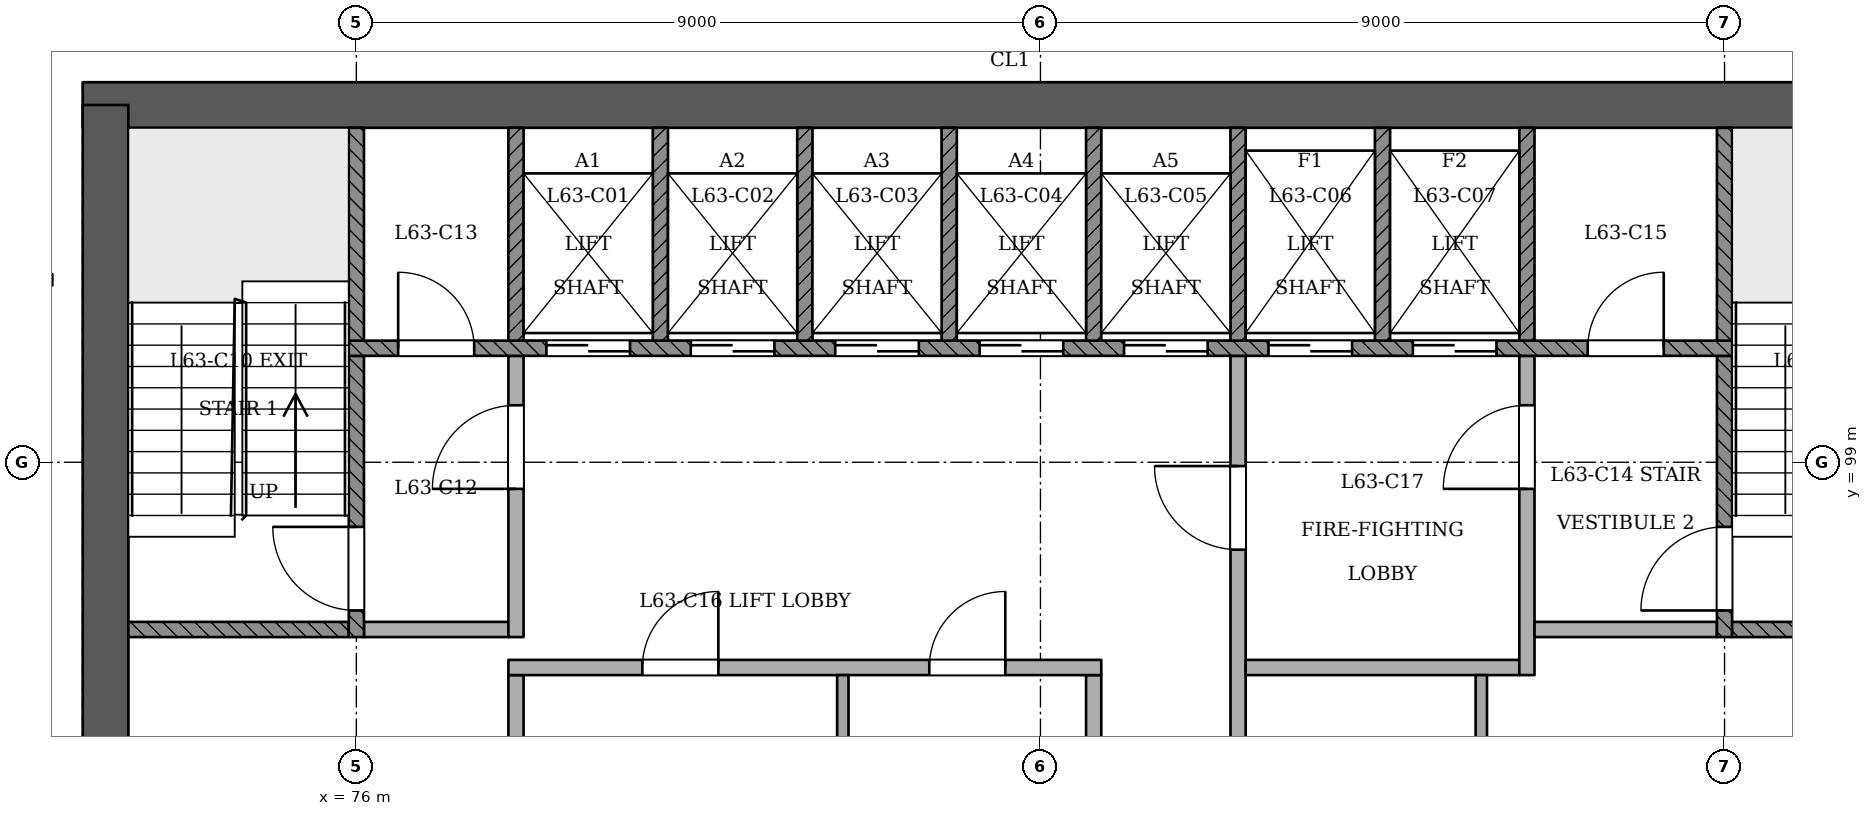
"""IFC4 building model, lengths in metres.
Left out: names, types, materials, properties, quantities, classifications, styles, units other than length and angle.
Written with IfcOpenShell. Run it as: python <this file> out.ifc"""

import sys

from ifc_helpers import new_model, si_unit, direction, frame, frame_2d, origin, place, context, subcontext, project, spatial, rectangle, extrude, element, fill, save


model = new_model("IFC4")
c1 = context("Model", 3, precision=1e-05, world=origin(), true_north=direction((0.0, 1.0)))
c2 = subcontext(c1, "Body", "Model", "MODEL_VIEW")
j1 = project(units=[si_unit("LENGTHUNIT", "METRE"), si_unit("PLANEANGLEUNIT", "RADIAN")], contexts=[c1])
p1 = place(None, origin())
s1 = spatial("IfcSite", under=j1, at=p1, CompositionType="ELEMENT")
p2 = place(p1, origin())
s2 = spatial("IfcBuilding", under=s1, at=p2, CompositionType="ELEMENT")
p3 = place(p2, frame((0.0, 0.0, 246.4)))
s3 = spatial("IfcBuildingStorey", under=s2, at=p3, CompositionType="ELEMENT", Elevation=246.4)
p4 = place(p3, frame((97.3, 103.7, 0.0), z_axis=(0.0, 0.0, 1.0), x_axis=(-1.0, 0.0, 0.0)))
e1 = element("IfcWall", 1, at=p4, inside=s3, PredefinedType="SHEAR", context=c2, shape_type="SweptSolid", body=[
    extrude(rectangle(XDim=24.9, YDim=0.6, at=frame_2d((12.45, 0.0))), origin(), (0.0, 0.0, 1.0), 3.6),
])
p5 = place(p3, frame((72.7, 103.7, 0.0), z_axis=(0.0, 0.0, 1.0), x_axis=(0.0, -1.0, 0.0)))
e2 = element("IfcWall", 2, at=p5, inside=s3, PredefinedType="SHEAR", context=c2, shape_type="SweptSolid", body=[
    extrude(rectangle(XDim=10.9, YDim=0.6, at=frame_2d((5.45, 0.0))), origin(), (0.0, 0.0, 1.0), 3.6),
])
p6 = place(p3, frame((72.0, 101.4, 0.0), z_axis=(0.0, 0.0, 1.0), x_axis=(-1.0, 0.0, 0.0)))
e3 = element("IfcWall", 3, at=p6, inside=s3, PredefinedType="PARTITIONING", context=c2, shape_type="SweptSolid", body=[
    extrude(rectangle(XDim=1.8, YDim=0.15, at=frame_2d((0.9, 0.0))), origin(), (0.0, 0.0, 1.0), 3.2),
])
p7 = place(p6, frame((0.525, 0.0, 0.0)))
e4 = element("IfcOpeningElement", 4, at=p7, cuts=e3, PredefinedType="OPENING", context=c2, shape_type="SweptSolid", body=[
    extrude(rectangle(XDim=1.0, YDim=2.1, at=frame_2d((0.5, 1.05))), frame((0.0, 0.085, 0.0), z_axis=(0.0, -1.0, 0.0), x_axis=(1.0, 0.0, 0.0)), (0.0, 0.0, 1.0), 0.171),
])
p8 = place(p3, frame((78.1, 93.4, 0.0), z_axis=(0.0, 0.0, 1.0), x_axis=(0.0, 1.0, 0.0)))
e5 = element("IfcWall", 5, at=p8, inside=s3, PredefinedType="PARTITIONING", context=c2, shape_type="SweptSolid", body=[
    extrude(rectangle(XDim=2.8, YDim=0.2, at=frame_2d((1.4, 0.0))), origin(), (0.0, 0.0, 1.0), 3.2),
])
p9 = place(p3, frame((82.4, 93.4, 0.0), z_axis=(0.0, 0.0, 1.0), x_axis=(0.0, 1.0, 0.0)))
e6 = element("IfcWall", 6, at=p9, inside=s3, PredefinedType="PARTITIONING", context=c2, shape_type="SweptSolid", body=[
    extrude(rectangle(XDim=2.8, YDim=0.15, at=frame_2d((1.4, 0.0))), origin(), (0.0, 0.0, 1.0), 3.2),
])
p10 = place(p3, frame((85.7, 93.4, 0.0), z_axis=(0.0, 0.0, 1.0), x_axis=(0.0, 1.0, 0.0)))
e7 = element("IfcWall", 7, at=p10, inside=s3, PredefinedType="PARTITIONING", context=c2, shape_type="SweptSolid", body=[
    extrude(rectangle(XDim=2.8, YDim=0.2, at=frame_2d((1.4, 0.0))), origin(), (0.0, 0.0, 1.0), 3.2),
])
p11 = place(p3, frame((87.6, 93.4, 0.0), z_axis=(0.0, 0.0, 1.0), x_axis=(0.0, 1.0, 0.0)))
e8 = element("IfcWall", 8, at=p11, inside=s3, PredefinedType="PARTITIONING", context=c2, shape_type="SweptSolid", body=[
    extrude(rectangle(XDim=7.0, YDim=0.2, at=frame_2d((3.5, 0.0))), origin(), (0.0, 0.0, 1.0), 3.2),
])
p12 = place(p11, frame((4.45, 0.0, 0.0)))
e9 = element("IfcOpeningElement", 9, at=p12, cuts=e8, PredefinedType="OPENING", context=c2, shape_type="SweptSolid", body=[
    extrude(rectangle(XDim=1.1, YDim=2.1, at=frame_2d((0.55, 1.05))), frame((0.0, 0.11, 0.0), z_axis=(0.0, -1.0, 0.0), x_axis=(1.0, 0.0, 0.0)), (0.0, 0.0, 1.0), 0.221),
])
p13 = place(p3, frame((90.8, 93.4, 0.0), z_axis=(0.0, 0.0, 1.0), x_axis=(0.0, 1.0, 0.0)))
e10 = element("IfcWall", 10, at=p13, inside=s3, PredefinedType="PARTITIONING", context=c2, shape_type="SweptSolid", body=[
    extrude(rectangle(XDim=2.8, YDim=0.15, at=frame_2d((1.4, 0.0))), origin(), (0.0, 0.0, 1.0), 3.2),
])
p14 = place(p3, frame((78.0, 96.3, 0.0), z_axis=(0.0, 0.0, 1.0), x_axis=(1.0, 0.0, 0.0)))
e11 = element("IfcWall", 11, at=p14, inside=s3, PredefinedType="PARTITIONING", context=c2, shape_type="SweptSolid", body=[
    extrude(rectangle(XDim=7.8, YDim=0.2, at=frame_2d((3.9, 0.0))), origin(), (0.0, 0.0, 1.0), 3.2),
])
p15 = place(p14, frame((1.762, 0.0, 0.0)))
e12 = element("IfcOpeningElement", 12, at=p15, cuts=e11, PredefinedType="OPENING", context=c2, shape_type="SweptSolid", body=[
    extrude(rectangle(XDim=1.0, YDim=2.1, at=frame_2d((0.5, 1.05))), frame((0.0, 0.11, 0.0), z_axis=(0.0, -1.0, 0.0), x_axis=(1.0, 0.0, 0.0)), (0.0, 0.0, 1.0), 0.221),
])
p16 = place(p14, frame((5.538, 0.0, 0.0)))
e13 = element("IfcOpeningElement", 13, at=p16, cuts=e11, PredefinedType="OPENING", context=c2, shape_type="SweptSolid", body=[
    extrude(rectangle(XDim=1.0, YDim=2.1, at=frame_2d((0.5, 1.05))), frame((0.0, 0.11, 0.0), z_axis=(0.0, -1.0, 0.0), x_axis=(1.0, 0.0, 0.0)), (0.0, 0.0, 1.0), 0.221),
])
p17 = place(p3, frame((87.7, 96.3, 0.0), z_axis=(0.0, 0.0, 1.0), x_axis=(1.0, 0.0, 0.0)))
e14 = element("IfcWall", 14, at=p17, inside=s3, PredefinedType="PARTITIONING", context=c2, shape_type="SweptSolid", body=[
    extrude(rectangle(XDim=3.6, YDim=0.2, at=frame_2d((1.8, 0.0))), origin(), (0.0, 0.0, 1.0), 3.2),
])
p18 = place(p3, frame((91.4, 96.2, 0.0), z_axis=(0.0, 0.0, 1.0), x_axis=(0.0, 1.0, 0.0)))
e15 = element("IfcWall", 15, at=p18, inside=s3, PredefinedType="PARTITIONING", context=c2, shape_type="SweptSolid", body=[
    extrude(rectangle(XDim=4.2, YDim=0.2, at=frame_2d((2.1, 0.0))), origin(), (0.0, 0.0, 1.0), 3.2),
])
p19 = place(p18, frame((2.45, 0.0, 0.0)))
e16 = element("IfcOpeningElement", 16, at=p19, cuts=e15, PredefinedType="OPENING", context=c2, shape_type="SweptSolid", body=[
    extrude(rectangle(XDim=1.1, YDim=2.1, at=frame_2d((0.55, 1.05))), frame((0.0, 0.11, 0.0), z_axis=(0.0, -1.0, 0.0), x_axis=(1.0, 0.0, 0.0)), (0.0, 0.0, 1.0), 0.221),
])
p20 = place(p3, frame((73.0, 96.8, 0.0), z_axis=(0.0, 0.0, 1.0), x_axis=(1.0, 0.0, 0.0)))
e17 = element("IfcWall", 17, at=p20, inside=s3, PredefinedType="SOLIDWALL", context=c2, shape_type="SweptSolid", body=[
    extrude(rectangle(XDim=2.9, YDim=0.2, at=frame_2d((1.45, 0.0))), origin(), (0.0, 0.0, 1.0), 3.2),
])
p21 = place(p3, frame((76.0, 96.7, 0.0), z_axis=(0.0, 0.0, 1.0), x_axis=(0.0, 1.0, 0.0)))
e18 = element("IfcWall", 18, at=p21, inside=s3, PredefinedType="SOLIDWALL", context=c2, shape_type="SweptSolid", body=[
    extrude(rectangle(XDim=3.7, YDim=0.2, at=frame_2d((1.85, 0.0))), origin(), (0.0, 0.0, 1.0), 3.2),
])
p22 = place(p21, frame((0.35, 0.0, 0.0)))
e19 = element("IfcOpeningElement", 19, at=p22, cuts=e18, PredefinedType="OPENING", context=c2, shape_type="SweptSolid", body=[
    extrude(rectangle(XDim=1.1, YDim=2.1, at=frame_2d((0.55, 1.05))), frame((0.0, 0.11, 0.0), z_axis=(0.0, -1.0, 0.0), x_axis=(1.0, 0.0, 0.0)), (0.0, 0.0, 1.0), 0.221),
])
p23 = place(p3, frame((76.1, 96.8, 0.0), z_axis=(0.0, 0.0, 1.0), x_axis=(1.0, 0.0, 0.0)))
e20 = element("IfcWall", 20, at=p23, inside=s3, PredefinedType="PARTITIONING", context=c2, shape_type="SweptSolid", body=[
    extrude(rectangle(XDim=1.9, YDim=0.2, at=frame_2d((0.95, 0.0))), origin(), (0.0, 0.0, 1.0), 3.2),
])
p24 = place(p3, frame((78.1, 96.7, 0.0), z_axis=(0.0, 0.0, 1.0), x_axis=(0.0, 1.0, 0.0)))
e21 = element("IfcWall", 21, at=p24, inside=s3, PredefinedType="PARTITIONING", context=c2, shape_type="SweptSolid", body=[
    extrude(rectangle(XDim=3.7, YDim=0.2, at=frame_2d((1.85, 0.0))), origin(), (0.0, 0.0, 1.0), 3.2),
])
p25 = place(p24, frame((1.95, 0.0, 0.0)))
e22 = element("IfcOpeningElement", 22, at=p25, cuts=e21, PredefinedType="OPENING", context=c2, shape_type="SweptSolid", body=[
    extrude(rectangle(XDim=1.1, YDim=2.1, at=frame_2d((0.55, 1.05))), frame((0.0, 0.11, 0.0), z_axis=(0.0, -1.0, 0.0), x_axis=(1.0, 0.0, 0.0)), (0.0, 0.0, 1.0), 0.221),
])
p26 = place(p3, frame((91.5, 96.8, 0.0), z_axis=(0.0, 0.0, 1.0), x_axis=(1.0, 0.0, 0.0)))
e23 = element("IfcWall", 23, at=p26, inside=s3, PredefinedType="PARTITIONING", context=c2, shape_type="SweptSolid", body=[
    extrude(rectangle(XDim=2.4, YDim=0.2, at=frame_2d((1.2, 0.0))), origin(), (0.0, 0.0, 1.0), 3.2),
])
p27 = place(p3, frame((94.0, 96.7, 0.0), z_axis=(0.0, 0.0, 1.0), x_axis=(0.0, 1.0, 0.0)))
e24 = element("IfcWall", 24, at=p27, inside=s3, PredefinedType="SOLIDWALL", context=c2, shape_type="SweptSolid", body=[
    extrude(rectangle(XDim=3.7, YDim=0.2, at=frame_2d((1.85, 0.0))), origin(), (0.0, 0.0, 1.0), 3.2),
])
p28 = place(p27, frame((0.35, 0.0, 0.0)))
e25 = element("IfcOpeningElement", 25, at=p28, cuts=e24, PredefinedType="OPENING", context=c2, shape_type="SweptSolid", body=[
    extrude(rectangle(XDim=1.1, YDim=2.1, at=frame_2d((0.55, 1.05))), frame((0.0, 0.11, 0.0), z_axis=(0.0, -1.0, 0.0), x_axis=(1.0, 0.0, 0.0)), (0.0, 0.0, 1.0), 0.221),
])
p29 = place(p3, frame((94.1, 96.8, 0.0), z_axis=(0.0, 0.0, 1.0), x_axis=(1.0, 0.0, 0.0)))
e26 = element("IfcWall", 26, at=p29, inside=s3, PredefinedType="SOLIDWALL", context=c2, shape_type="SweptSolid", body=[
    extrude(rectangle(XDim=2.9, YDim=0.2, at=frame_2d((1.45, 0.0))), origin(), (0.0, 0.0, 1.0), 3.2),
])
p30 = place(p3, frame((75.9, 100.5, 0.0), z_axis=(0.0, 0.0, 1.0), x_axis=(1.0, 0.0, 0.0)))
e27 = element("IfcWall", 27, at=p30, inside=s3, PredefinedType="SOLIDWALL", context=c2, shape_type="SweptSolid", body=[
    extrude(rectangle(XDim=18.2, YDim=0.2, at=frame_2d((9.1, 0.0))), origin(), (0.0, 0.0, 1.0), 3.2),
])
p31 = place(p30, frame((2.6, 0.0, 0.0)))
e28 = element("IfcOpeningElement", 28, at=p31, cuts=e27, PredefinedType="OPENING", context=c2, shape_type="SweptSolid", body=[
    extrude(rectangle(XDim=1.1, YDim=2.1, at=frame_2d((0.55, 1.05))), frame((0.0, 0.11, 0.0), z_axis=(0.0, -1.0, 0.0), x_axis=(1.0, 0.0, 0.0)), (0.0, 0.0, 1.0), 0.221),
])
p32 = place(p30, frame((4.5, 0.0, 0.0)))
e29 = element("IfcOpeningElement", 29, at=p32, cuts=e27, PredefinedType="OPENING", context=c2, shape_type="SweptSolid", body=[
    extrude(rectangle(XDim=1.1, YDim=2.1, at=frame_2d((0.55, 1.05))), frame((0.0, 0.11, 0.0), z_axis=(0.0, -1.0, 0.0), x_axis=(1.0, 0.0, 0.0)), (0.0, 0.0, 1.0), 0.221),
])
p33 = place(p30, frame((6.4, 0.0, 0.0)))
e30 = element("IfcOpeningElement", 30, at=p33, cuts=e27, PredefinedType="OPENING", context=c2, shape_type="SweptSolid", body=[
    extrude(rectangle(XDim=1.1, YDim=2.1, at=frame_2d((0.55, 1.05))), frame((0.0, 0.11, 0.0), z_axis=(0.0, -1.0, 0.0), x_axis=(1.0, 0.0, 0.0)), (0.0, 0.0, 1.0), 0.221),
])
p34 = place(p30, frame((8.3, 0.0, 0.0)))
e31 = element("IfcOpeningElement", 31, at=p34, cuts=e27, PredefinedType="OPENING", context=c2, shape_type="SweptSolid", body=[
    extrude(rectangle(XDim=1.1, YDim=2.1, at=frame_2d((0.55, 1.05))), frame((0.0, 0.11, 0.0), z_axis=(0.0, -1.0, 0.0), x_axis=(1.0, 0.0, 0.0)), (0.0, 0.0, 1.0), 0.221),
])
p35 = place(p30, frame((10.2, 0.0, 0.0)))
e32 = element("IfcOpeningElement", 32, at=p35, cuts=e27, PredefinedType="OPENING", context=c2, shape_type="SweptSolid", body=[
    extrude(rectangle(XDim=1.1, YDim=2.1, at=frame_2d((0.55, 1.05))), frame((0.0, 0.11, 0.0), z_axis=(0.0, -1.0, 0.0), x_axis=(1.0, 0.0, 0.0)), (0.0, 0.0, 1.0), 0.221),
])
p36 = place(p30, frame((12.1, 0.0, 0.0)))
e33 = element("IfcOpeningElement", 33, at=p36, cuts=e27, PredefinedType="OPENING", context=c2, shape_type="SweptSolid", body=[
    extrude(rectangle(XDim=1.1, YDim=2.1, at=frame_2d((0.55, 1.05))), frame((0.0, 0.11, 0.0), z_axis=(0.0, -1.0, 0.0), x_axis=(1.0, 0.0, 0.0)), (0.0, 0.0, 1.0), 0.221),
])
p37 = place(p30, frame((14.0, 0.0, 0.0)))
e34 = element("IfcOpeningElement", 34, at=p37, cuts=e27, PredefinedType="OPENING", context=c2, shape_type="SweptSolid", body=[
    extrude(rectangle(XDim=1.1, YDim=2.1, at=frame_2d((0.55, 1.05))), frame((0.0, 0.11, 0.0), z_axis=(0.0, -1.0, 0.0), x_axis=(1.0, 0.0, 0.0)), (0.0, 0.0, 1.0), 0.221),
])
p38 = place(p30, frame((0.65, 0.0, 0.0)))
e35 = element("IfcOpeningElement", 35, at=p38, cuts=e27, PredefinedType="OPENING", context=c2, shape_type="SweptSolid", body=[
    extrude(rectangle(XDim=1.0, YDim=2.1, at=frame_2d((0.5, 1.05))), frame((0.0, 0.11, 0.0), z_axis=(0.0, -1.0, 0.0), x_axis=(1.0, 0.0, 0.0)), (0.0, 0.0, 1.0), 0.221),
])
p39 = place(p30, frame((16.3, 0.0, 0.0)))
e36 = element("IfcOpeningElement", 36, at=p39, cuts=e27, PredefinedType="OPENING", context=c2, shape_type="SweptSolid", body=[
    extrude(rectangle(XDim=1.0, YDim=2.1, at=frame_2d((0.5, 1.05))), frame((0.0, 0.11, 0.0), z_axis=(0.0, -1.0, 0.0), x_axis=(1.0, 0.0, 0.0)), (0.0, 0.0, 1.0), 0.221),
])
for number, where, z_axis, x_axis in (
    (37, (76.0, 100.6, 0.0), (0.0, 0.0, 1.0), (0.0, 1.0, 0.0)),
    (38, (78.1, 100.6, 0.0), (0.0, 0.0, 1.0), (0.0, 1.0, 0.0)),
    (39, (80.0, 100.6, 0.0), (0.0, 0.0, 1.0), (0.0, 1.0, 0.0)),
    (40, (81.9, 100.6, 0.0), (0.0, 0.0, 1.0), (0.0, 1.0, 0.0)),
    (41, (83.8, 100.6, 0.0), (0.0, 0.0, 1.0), (0.0, 1.0, 0.0)),
    (42, (85.7, 100.6, 0.0), (0.0, 0.0, 1.0), (0.0, 1.0, 0.0)),
    (43, (87.6, 100.6, 0.0), (0.0, 0.0, 1.0), (0.0, 1.0, 0.0)),
    (44, (89.5, 100.6, 0.0), (0.0, 0.0, 1.0), (0.0, 1.0, 0.0)),
    (45, (91.4, 100.6, 0.0), (0.0, 0.0, 1.0), (0.0, 1.0, 0.0)),
    (46, (94.0, 100.6, 0.0), (0.0, 0.0, 1.0), (0.0, 1.0, 0.0)),
):
    element("IfcWall", number, at=place(p3, frame(where, z_axis=z_axis, x_axis=x_axis)), inside=s3, PredefinedType="SOLIDWALL", context=c2, shape_type="SweptSolid", body=[
        extrude(rectangle(XDim=2.8, YDim=0.2, at=frame_2d((1.4, 0.0))), origin(), (0.0, 0.0, 1.0), 3.2),
    ])
p40 = place(p31, origin())
e47 = element("IfcDoor", 47, at=p40, inside=s3, OperationType="SLIDING_TO_RIGHT", PredefinedType="NOTDEFINED", context=c2, shape_type="SweptSolid", body=[
    extrude(rectangle(XDim=1.1, YDim=2.1, at=frame_2d((0.55, 1.05))), frame((0.0, 0.025, 0.0), z_axis=(0.0, -1.0, 0.0), x_axis=(1.0, 0.0, 0.0)), (0.0, 0.0, 1.0), 0.05),
])
fill(e28, e47)
p41 = place(p32, origin())
e48 = element("IfcDoor", 48, at=p41, inside=s3, OperationType="SLIDING_TO_LEFT", PredefinedType="NOTDEFINED", context=c2, shape_type="SweptSolid", body=[
    extrude(rectangle(XDim=1.1, YDim=2.1, at=frame_2d((0.55, 1.05))), frame((0.0, 0.025, 0.0), z_axis=(0.0, -1.0, 0.0), x_axis=(1.0, 0.0, 0.0)), (0.0, 0.0, 1.0), 0.05),
])
fill(e29, e48)
p42 = place(p33, origin())
e49 = element("IfcDoor", 49, at=p42, inside=s3, OperationType="SLIDING_TO_RIGHT", PredefinedType="NOTDEFINED", context=c2, shape_type="SweptSolid", body=[
    extrude(rectangle(XDim=1.1, YDim=2.1, at=frame_2d((0.55, 1.05))), frame((0.0, 0.025, 0.0), z_axis=(0.0, -1.0, 0.0), x_axis=(1.0, 0.0, 0.0)), (0.0, 0.0, 1.0), 0.05),
])
fill(e30, e49)
p43 = place(p34, origin())
e50 = element("IfcDoor", 50, at=p43, inside=s3, OperationType="SLIDING_TO_LEFT", PredefinedType="NOTDEFINED", context=c2, shape_type="SweptSolid", body=[
    extrude(rectangle(XDim=1.1, YDim=2.1, at=frame_2d((0.55, 1.05))), frame((0.0, 0.025, 0.0), z_axis=(0.0, -1.0, 0.0), x_axis=(1.0, 0.0, 0.0)), (0.0, 0.0, 1.0), 0.05),
])
fill(e31, e50)
p44 = place(p35, origin())
e51 = element("IfcDoor", 51, at=p44, inside=s3, OperationType="SLIDING_TO_RIGHT", PredefinedType="NOTDEFINED", context=c2, shape_type="SweptSolid", body=[
    extrude(rectangle(XDim=1.1, YDim=2.1, at=frame_2d((0.55, 1.05))), frame((0.0, 0.025, 0.0), z_axis=(0.0, -1.0, 0.0), x_axis=(1.0, 0.0, 0.0)), (0.0, 0.0, 1.0), 0.05),
])
fill(e32, e51)
p45 = place(p36, origin())
e52 = element("IfcDoor", 52, at=p45, inside=s3, OperationType="SLIDING_TO_RIGHT", PredefinedType="NOTDEFINED", context=c2, shape_type="SweptSolid", body=[
    extrude(rectangle(XDim=1.1, YDim=2.1, at=frame_2d((0.55, 1.05))), frame((0.0, 0.025, 0.0), z_axis=(0.0, -1.0, 0.0), x_axis=(1.0, 0.0, 0.0)), (0.0, 0.0, 1.0), 0.05),
])
fill(e33, e52)
p46 = place(p37, origin())
e53 = element("IfcDoor", 53, at=p46, inside=s3, OperationType="SLIDING_TO_LEFT", PredefinedType="NOTDEFINED", context=c2, shape_type="SweptSolid", body=[
    extrude(rectangle(XDim=1.1, YDim=2.1, at=frame_2d((0.55, 1.05))), frame((0.0, 0.025, 0.0), z_axis=(0.0, -1.0, 0.0), x_axis=(1.0, 0.0, 0.0)), (0.0, 0.0, 1.0), 0.05),
])
fill(e34, e53)
p47 = place(p22, origin())
e54 = element("IfcDoor", 54, at=p47, inside=s3, OperationType="SINGLE_SWING_RIGHT", PredefinedType="NOTDEFINED", context=c2, shape_type="SweptSolid", body=[
    extrude(rectangle(XDim=1.1, YDim=2.1, at=frame_2d((0.55, 1.05))), frame((0.0, 0.025, 0.0), z_axis=(0.0, -1.0, 0.0), x_axis=(1.0, 0.0, 0.0)), (0.0, 0.0, 1.0), 0.05),
])
fill(e19, e54)
p48 = place(p28, origin())
e55 = element("IfcDoor", 55, at=p48, inside=s3, OperationType="SINGLE_SWING_LEFT", PredefinedType="NOTDEFINED", context=c2, shape_type="SweptSolid", body=[
    extrude(rectangle(XDim=1.1, YDim=2.1, at=frame_2d((0.55, 1.05))), frame((0.0, 0.025, 0.0), z_axis=(0.0, -1.0, 0.0), x_axis=(1.0, 0.0, 0.0)), (0.0, 0.0, 1.0), 0.05),
])
fill(e25, e55)
p49 = place(p25, origin())
e56 = element("IfcDoor", 56, at=p49, inside=s3, OperationType="SINGLE_SWING_LEFT", PredefinedType="NOTDEFINED", context=c2, shape_type="SweptSolid", body=[
    extrude(rectangle(XDim=1.1, YDim=2.1, at=frame_2d((0.55, 1.05))), frame((0.0, 0.025, 0.0), z_axis=(0.0, -1.0, 0.0), x_axis=(1.0, 0.0, 0.0)), (0.0, 0.0, 1.0), 0.05),
])
fill(e22, e56)
p50 = place(p12, origin())
e57 = element("IfcDoor", 57, at=p50, inside=s3, OperationType="SINGLE_SWING_RIGHT", PredefinedType="NOTDEFINED", context=c2, shape_type="SweptSolid", body=[
    extrude(rectangle(XDim=1.1, YDim=2.1, at=frame_2d((0.55, 1.05))), frame((0.0, 0.025, 0.0), z_axis=(0.0, -1.0, 0.0), x_axis=(1.0, 0.0, 0.0)), (0.0, 0.0, 1.0), 0.05),
])
fill(e9, e57)
p51 = place(p19, origin())
e58 = element("IfcDoor", 58, at=p51, inside=s3, OperationType="SINGLE_SWING_LEFT", PredefinedType="NOTDEFINED", context=c2, shape_type="SweptSolid", body=[
    extrude(rectangle(XDim=1.1, YDim=2.1, at=frame_2d((0.55, 1.05))), frame((0.0, 0.025, 0.0), z_axis=(0.0, -1.0, 0.0), x_axis=(1.0, 0.0, 0.0)), (0.0, 0.0, 1.0), 0.05),
])
fill(e16, e58)
p52 = place(p38, origin())
e59 = element("IfcDoor", 59, at=p52, inside=s3, OperationType="SINGLE_SWING_LEFT", PredefinedType="NOTDEFINED", context=c2, shape_type="SweptSolid", body=[
    extrude(rectangle(XDim=1.0, YDim=2.1, at=frame_2d((0.5, 1.05))), frame((0.0, 0.025, 0.0), z_axis=(0.0, -1.0, 0.0), x_axis=(1.0, 0.0, 0.0)), (0.0, 0.0, 1.0), 0.05),
])
fill(e35, e59)
p53 = place(p39, origin())
e60 = element("IfcDoor", 60, at=p53, inside=s3, OperationType="SINGLE_SWING_RIGHT", PredefinedType="NOTDEFINED", context=c2, shape_type="SweptSolid", body=[
    extrude(rectangle(XDim=1.0, YDim=2.1, at=frame_2d((0.5, 1.05))), frame((0.0, 0.025, 0.0), z_axis=(0.0, -1.0, 0.0), x_axis=(1.0, 0.0, 0.0)), (0.0, 0.0, 1.0), 0.05),
])
fill(e36, e60)
p54 = place(p15, origin())
e61 = element("IfcDoor", 61, at=p54, inside=s3, OperationType="SINGLE_SWING_RIGHT", PredefinedType="NOTDEFINED", context=c2, shape_type="SweptSolid", body=[
    extrude(rectangle(XDim=1.0, YDim=2.1, at=frame_2d((0.5, 1.05))), frame((0.0, 0.025, 0.0), z_axis=(0.0, -1.0, 0.0), x_axis=(1.0, 0.0, 0.0)), (0.0, 0.0, 1.0), 0.05),
])
fill(e12, e61)
p55 = place(p16, origin())
e62 = element("IfcDoor", 62, at=p55, inside=s3, OperationType="SINGLE_SWING_RIGHT", PredefinedType="NOTDEFINED", context=c2, shape_type="SweptSolid", body=[
    extrude(rectangle(XDim=1.0, YDim=2.1, at=frame_2d((0.5, 1.05))), frame((0.0, 0.025, 0.0), z_axis=(0.0, -1.0, 0.0), x_axis=(1.0, 0.0, 0.0)), (0.0, 0.0, 1.0), 0.05),
])
fill(e13, e62)
save(model, sys.argv[1])
